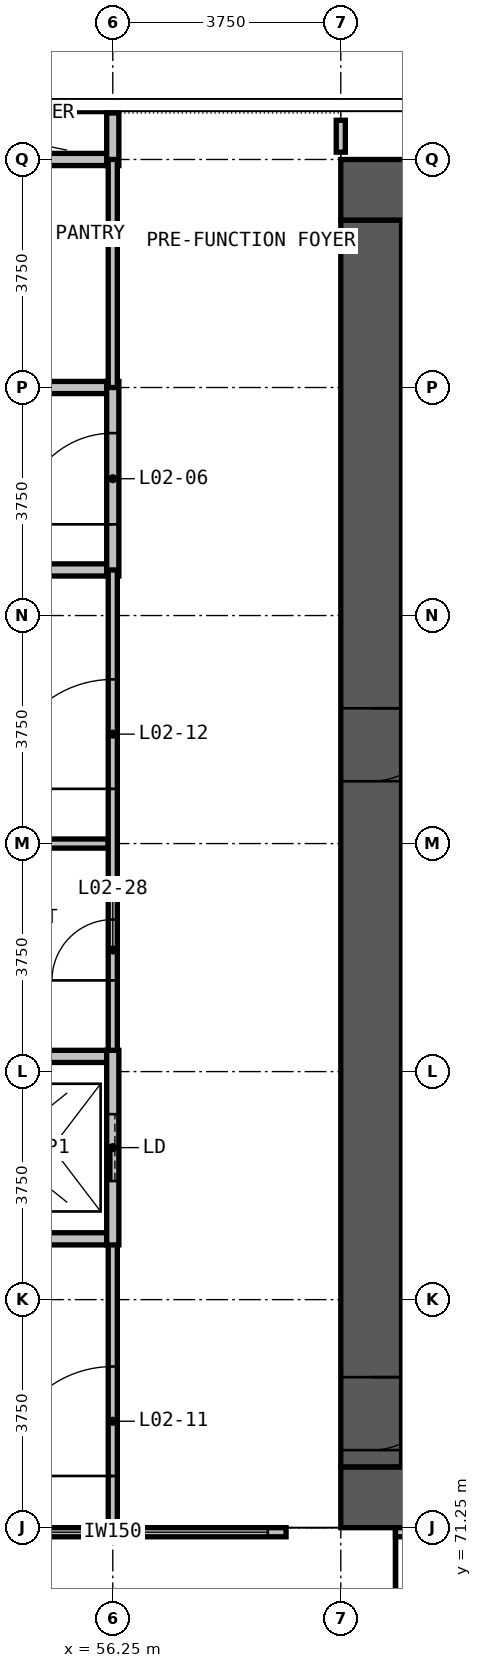
"""IFC4 building model, lengths in metres.
Left out: names, types, materials, properties, quantities, classifications, styles, units other than length and angle.
Written with IfcOpenShell. Run it as: python <this file> out.ifc"""

import sys

from ifc_helpers import new_model, si_unit, direction, frame, frame_2d, origin, place, context, subcontext, project, spatial, polyline, rectangle, outline, extrude, element, fill, save


model = new_model("IFC4")
c1 = context("Model", 3, precision=1e-05, world=origin(), true_north=direction((0.0, 1.0)))
c2 = subcontext(c1, "Body", "Model", "MODEL_VIEW")
j1 = project(units=[si_unit("LENGTHUNIT", "METRE"), si_unit("PLANEANGLEUNIT", "RADIAN")], contexts=[c1])
p1 = place(None, origin())
s1 = spatial("IfcSite", under=j1, at=p1, CompositionType="ELEMENT")
p2 = place(p1, origin())
s2 = spatial("IfcBuilding", under=s1, at=p2, CompositionType="ELEMENT")
p3 = place(p2, frame((0.0, 0.0, 16.5)))
s3 = spatial("IfcBuildingStorey", under=s2, at=p3, CompositionType="ELEMENT", Elevation=16.5)
p4 = place(p3, frame((60.9, 62.22, 0.0), z_axis=(1.0, 0.0, 0.0), x_axis=(0.0, 1.0, 0.0)))
e1 = element("IfcWall", 1, at=p4, inside=s3, PredefinedType="SHEAR", context=c2, shape_type="SweptSolid", body=[
    extrude(outline(polyline([(0.0, 0.0), (9.03, 0.0), (9.03, 7.5), (5.28, 7.5), (5.28, 7.15), (-17.22, 7.15), (-17.22, 7.5), (-20.97, 7.5), (-20.97, 0.0), (-11.941, 0.0), (-11.595, 0.488), (-10.658, 1.607), (-9.72, 2.522), (-8.783, 3.234), (-7.845, 3.743), (-6.908, 4.048), (-5.97, 4.15), (-5.033, 4.048), (-4.095, 3.743), (-3.158, 3.234), (-2.22, 2.522), (-1.283, 1.607), (-0.345, 0.488), (0.0, 0.0)])), origin(), (0.0, 0.0, -1.0), 1.8),
])
for number, where, z_axis, x_axis in (
    (2, (60.0, 71.75, 0.0), (0.0, 0.0, 1.0), (1.0, 0.0, 0.0)),
    (3, (90.0, 93.25, 0.0), (0.0, 0.0, 1.0), (-1.0, 0.0, 0.0)),
):
    element("IfcWall", number, at=place(p3, frame(where, z_axis=z_axis, x_axis=x_axis)), inside=s3, PredefinedType="SHEAR", context=c2, shape_type="SweptSolid", body=[
        extrude(rectangle(XDim=30.0, YDim=1.0, at=frame_2d((15.0, 0.0))), origin(), (0.0, 0.0, 1.0), 7.5),
    ])
p5 = place(p3, frame((60.5, 92.75, 0.0), z_axis=(0.0, 0.0, 1.0), x_axis=(0.0, -1.0, 0.0)))
e4 = element("IfcWall", 4, at=p5, inside=s3, PredefinedType="SHEAR", context=c2, shape_type="SweptSolid", body=[
    extrude(rectangle(XDim=20.5, YDim=1.0, at=frame_2d((10.25, 0.0))), origin(), (0.0, 0.0, 1.0), 7.5),
])
p6 = place(p5, frame((19.025, 0.0, 0.0)))
e5 = element("IfcOpeningElement", 5, at=p6, cuts=e4, PredefinedType="OPENING", context=c2, shape_type="SweptSolid", body=[
    extrude(rectangle(XDim=1.2, YDim=2.2, at=frame_2d((0.6, 1.1))), frame((0.0, 0.51, 0.0), z_axis=(0.0, -1.0, 0.0), x_axis=(1.0, 0.0, 0.0)), (0.0, 0.0, 1.0), 1.02),
])
p7 = place(p5, frame((8.025, 0.0, 0.0)))
e6 = element("IfcOpeningElement", 6, at=p7, cuts=e4, PredefinedType="OPENING", context=c2, shape_type="SweptSolid", body=[
    extrude(rectangle(XDim=1.2, YDim=2.2, at=frame_2d((0.6, 1.1))), frame((0.0, 0.51, 0.0), z_axis=(0.0, -1.0, 0.0), x_axis=(1.0, 0.0, 0.0)), (0.0, 0.0, 1.0), 1.02),
])
p8 = place(p3, frame((53.4, 71.175, 0.0), z_axis=(0.0, 0.0, 1.0), x_axis=(1.0, 0.0, 0.0)))
e7 = element("IfcWall", 7, at=p8, inside=s3, PredefinedType="SOLIDWALL", context=c2, shape_type="SweptSolid", body=[
    extrude(rectangle(XDim=5.7, YDim=0.15, at=frame_2d((2.85, 0.0))), origin(), (0.0, 0.0, 1.0), 7.15),
])
p9 = place(p8, frame((0.3, 0.0, 0.9)))
e8 = element("IfcOpeningElement", 8, at=p9, cuts=e7, PredefinedType="OPENING", context=c2, shape_type="SweptSolid", body=[
    extrude(rectangle(XDim=2.4, YDim=3.6, at=frame_2d((1.2, 1.8))), frame((0.0, 0.085, 0.0), z_axis=(0.0, -1.0, 0.0), x_axis=(1.0, 0.0, 0.0)), (0.0, 0.0, 1.0), 0.17),
])
p10 = place(p8, frame((3.0, 0.0, 0.9)))
e9 = element("IfcOpeningElement", 9, at=p10, cuts=e7, PredefinedType="OPENING", context=c2, shape_type="SweptSolid", body=[
    extrude(rectangle(XDim=2.4, YDim=3.6, at=frame_2d((1.2, 1.8))), frame((0.0, 0.085, 0.0), z_axis=(0.0, -1.0, 0.0), x_axis=(1.0, 0.0, 0.0)), (0.0, 0.0, 1.0), 0.17),
])
p11 = place(p3, frame((60.9, 71.175, 0.0), z_axis=(0.0, 0.0, 1.0), x_axis=(1.0, 0.0, 0.0)))
e10 = element("IfcWall", 10, at=p11, inside=s3, PredefinedType="SOLIDWALL", context=c2, shape_type="SweptSolid", body=[
    extrude(rectangle(XDim=5.7, YDim=0.15, at=frame_2d((2.85, 0.0))), origin(), (0.0, 0.0, 1.0), 7.15),
])
p12 = place(p3, frame((52.6, 93.75, 0.0), z_axis=(0.0, 0.0, 1.0), x_axis=(1.0, 0.0, 0.0)))
e11 = element("IfcWall", 11, at=p12, inside=s3, PredefinedType="PARTITIONING", context=c2, shape_type="SweptSolid", body=[
    extrude(rectangle(XDim=3.55, YDim=0.2, at=frame_2d((1.775, 0.0))), origin(), (0.0, 0.0, 1.0), 7.15),
])
p13 = place(p3, frame((56.25, 93.65, 0.0), z_axis=(0.0, 0.0, 1.0), x_axis=(0.0, 1.0, 0.0)))
e12 = element("IfcWall", 12, at=p13, inside=s3, PredefinedType="PARTITIONING", context=c2, shape_type="SweptSolid", body=[
    extrude(rectangle(XDim=0.865, YDim=0.2, at=frame_2d((0.433, 0.0))), origin(), (0.0, 0.0, 1.0), 7.15),
])
p14 = place(p3, frame((43.625, 87.0, 0.0), z_axis=(0.0, 0.0, 1.0), x_axis=(1.0, 0.0, 0.0)))
e13 = element("IfcWall", 13, at=p14, inside=s3, PredefinedType="PARTITIONING", context=c2, shape_type="SweptSolid", body=[
    extrude(rectangle(XDim=12.525, YDim=0.2, at=frame_2d((6.262, 0.0))), origin(), (0.0, 0.0, 1.0), 7.15),
])
p15 = place(p14, frame((5.95, 0.0, 0.0)))
e14 = element("IfcOpeningElement", 14, at=p15, cuts=e13, PredefinedType="OPENING", context=c2, shape_type="SweptSolid", body=[
    extrude(rectangle(XDim=1.8, YDim=2.2, at=frame_2d((0.9, 1.1))), frame((0.0, 0.11, 0.0), z_axis=(0.0, -1.0, 0.0), x_axis=(1.0, 0.0, 0.0)), (0.0, 0.0, 1.0), 0.22),
])
p16 = place(p3, frame((45.1, 90.0, 0.0), z_axis=(0.0, 0.0, 1.0), x_axis=(1.0, 0.0, 0.0)))
e15 = element("IfcWall", 15, at=p16, inside=s3, PredefinedType="PARTITIONING", context=c2, shape_type="SweptSolid", body=[
    extrude(rectangle(XDim=11.05, YDim=0.2, at=frame_2d((5.525, 0.0))), origin(), (0.0, 0.0, 1.0), 7.15),
])
p17 = place(p16, frame((4.45, 0.0, 0.0)))
e16 = element("IfcOpeningElement", 16, at=p17, cuts=e15, PredefinedType="OPENING", context=c2, shape_type="SweptSolid", body=[
    extrude(rectangle(XDim=0.9, YDim=2.2, at=frame_2d((0.45, 1.1))), frame((0.0, 0.11, 0.0), z_axis=(0.0, -1.0, 0.0), x_axis=(1.0, 0.0, 0.0)), (0.0, 0.0, 1.0), 0.22),
])
p18 = place(p16, frame((8.8, 0.0, 0.0)))
e17 = element("IfcOpeningElement", 17, at=p18, cuts=e15, PredefinedType="OPENING", context=c2, shape_type="SweptSolid", body=[
    extrude(rectangle(XDim=0.9, YDim=2.2, at=frame_2d((0.45, 1.1))), frame((0.0, 0.11, 0.0), z_axis=(0.0, -1.0, 0.0), x_axis=(1.0, 0.0, 0.0)), (0.0, 0.0, 1.0), 0.22),
])
p19 = place(p3, frame((56.25, 86.9, 0.0), z_axis=(0.0, 0.0, 1.0), x_axis=(0.0, 1.0, 0.0)))
e18 = element("IfcWall", 18, at=p19, inside=s3, PredefinedType="PARTITIONING", context=c2, shape_type="SweptSolid", body=[
    extrude(rectangle(XDim=3.2, YDim=0.2, at=frame_2d((1.6, 0.0))), origin(), (0.0, 0.0, 1.0), 7.15),
])
p20 = place(p19, frame((0.85, 0.0, 0.0)))
e19 = element("IfcOpeningElement", 19, at=p20, cuts=e18, PredefinedType="OPENING", context=c2, shape_type="SweptSolid", body=[
    extrude(rectangle(XDim=1.5, YDim=2.2, at=frame_2d((0.75, 1.1))), frame((0.0, 0.11, 0.0), z_axis=(0.0, -1.0, 0.0), x_axis=(1.0, 0.0, 0.0)), (0.0, 0.0, 1.0), 0.22),
])
p21 = place(p3, frame((52.575, 82.5, 0.0), z_axis=(0.0, 0.0, 1.0), x_axis=(1.0, 0.0, 0.0)))
e20 = element("IfcWall", 20, at=p21, inside=s3, PredefinedType="PARTITIONING", context=c2, shape_type="SweptSolid", body=[
    extrude(rectangle(XDim=3.6, YDim=0.15, at=frame_2d((1.8, 0.0))), origin(), (0.0, 0.0, 1.0), 7.15),
])
p22 = place(p3, frame((56.25, 71.25, 0.0), z_axis=(0.0, 0.0, 1.0), x_axis=(0.0, 1.0, 0.0)))
e21 = element("IfcWall", 21, at=p22, inside=s3, PredefinedType="PARTITIONING", context=c2, shape_type="SweptSolid", body=[
    extrude(rectangle(XDim=4.85, YDim=0.15, at=frame_2d((2.425, 0.0))), origin(), (0.0, 0.0, 1.0), 7.15),
])
p23 = place(p22, frame((0.85, 0.0, 0.0)))
e22 = element("IfcOpeningElement", 22, at=p23, cuts=e21, PredefinedType="OPENING", context=c2, shape_type="SweptSolid", body=[
    extrude(rectangle(XDim=1.8, YDim=2.2, at=frame_2d((0.9, 1.1))), frame((0.0, 0.085, 0.0), z_axis=(0.0, -1.0, 0.0), x_axis=(1.0, 0.0, 0.0)), (0.0, 0.0, 1.0), 0.17),
])
p24 = place(p3, frame((56.25, 78.9, 0.0), z_axis=(0.0, 0.0, 1.0), x_axis=(0.0, 1.0, 0.0)))
e23 = element("IfcWall", 23, at=p24, inside=s3, PredefinedType="PARTITIONING", context=c2, shape_type="SweptSolid", body=[
    extrude(rectangle(XDim=8.1, YDim=0.15, at=frame_2d((4.05, 0.0))), origin(), (0.0, 0.0, 1.0), 7.15),
])
p25 = place(p24, frame((4.5, 0.0, 0.0)))
e24 = element("IfcOpeningElement", 24, at=p25, cuts=e23, PredefinedType="OPENING", context=c2, shape_type="SweptSolid", body=[
    extrude(rectangle(XDim=1.8, YDim=2.2, at=frame_2d((0.9, 1.1))), frame((0.0, 0.085, 0.0), z_axis=(0.0, -1.0, 0.0), x_axis=(1.0, 0.0, 0.0)), (0.0, 0.0, 1.0), 0.17),
])
p26 = place(p24, frame((1.35, 0.0, 0.0)))
e25 = element("IfcOpeningElement", 25, at=p26, cuts=e23, PredefinedType="OPENING", context=c2, shape_type="SweptSolid", body=[
    extrude(rectangle(XDim=1.0, YDim=2.2, at=frame_2d((0.5, 1.1))), frame((0.0, 0.085, 0.0), z_axis=(0.0, -1.0, 0.0), x_axis=(1.0, 0.0, 0.0)), (0.0, 0.0, 1.0), 0.17),
])
p27 = place(p3, frame((56.25, 90.0, 0.0), z_axis=(0.0, 0.0, 1.0), x_axis=(0.0, 1.0, 0.0)))
e26 = element("IfcWall", 26, at=p27, inside=s3, PredefinedType="PARTITIONING", context=c2, shape_type="SweptSolid", body=[
    extrude(rectangle(XDim=3.75, YDim=0.15, at=frame_2d((1.875, 0.0))), origin(), (0.0, 0.0, 1.0), 7.15),
])
p28 = place(p3, frame((60.0, 93.87, 0.0), z_axis=(0.0, 0.0, 1.0), x_axis=(0.0, 1.0, 0.0)))
e27 = element("IfcWall", 27, at=p28, inside=s3, PredefinedType="PARTITIONING", context=c2, shape_type="SweptSolid", body=[
    extrude(rectangle(XDim=0.525, YDim=0.15, at=frame_2d((0.262, 0.0))), origin(), (0.0, 0.0, 1.0), 7.15),
])
for number, where, z_axis, x_axis in (
    (28, (52.6, 76.0, 0.0), (0.0, 0.0, 1.0), (1.0, 0.0, 0.0)),
    (29, (52.6, 79.0, 0.0), (0.0, 0.0, 1.0), (1.0, 0.0, 0.0)),
):
    element("IfcWall", number, at=place(p3, frame(where, z_axis=z_axis, x_axis=x_axis)), inside=s3, PredefinedType="PARTITIONING", context=c2, shape_type="SweptSolid", body=[
        extrude(rectangle(XDim=3.55, YDim=0.2, at=frame_2d((1.775, 0.0))), origin(), (0.0, 0.0, 1.0), 7.15),
    ])
p29 = place(p3, frame((56.25, 75.9, 0.0), z_axis=(0.0, 0.0, 1.0), x_axis=(0.0, 1.0, 0.0)))
e30 = element("IfcWall", 30, at=p29, inside=s3, PredefinedType="PARTITIONING", context=c2, shape_type="SweptSolid", body=[
    extrude(rectangle(XDim=3.2, YDim=0.2, at=frame_2d((1.6, 0.0))), origin(), (0.0, 0.0, 1.0), 7.15),
])
p30 = place(p29, frame((1.05, 0.0, 0.0)))
e31 = element("IfcOpeningElement", 31, at=p30, cuts=e30, PredefinedType="OPENING", context=c2, shape_type="SweptSolid", body=[
    extrude(rectangle(XDim=1.1, YDim=2.2, at=frame_2d((0.55, 1.1))), frame((0.0, 0.11, 0.0), z_axis=(0.0, -1.0, 0.0), x_axis=(1.0, 0.0, 0.0)), (0.0, 0.0, 1.0), 0.22),
])
p31 = place(p9, origin())
e32 = element("IfcWindow", 32, at=p31, inside=s3, PartitioningType="SINGLE_PANEL", PredefinedType="WINDOW", context=c2, shape_type="SweptSolid", body=[
    extrude(rectangle(XDim=2.4, YDim=3.6, at=frame_2d((1.2, 1.8))), frame((0.0, 0.03, 0.0), z_axis=(0.0, -1.0, 0.0), x_axis=(1.0, 0.0, 0.0)), (0.0, 0.0, 1.0), 0.06),
])
fill(e8, e32)
p32 = place(p10, origin())
e33 = element("IfcWindow", 33, at=p32, inside=s3, PartitioningType="SINGLE_PANEL", PredefinedType="WINDOW", context=c2, shape_type="SweptSolid", body=[
    extrude(rectangle(XDim=2.4, YDim=3.6, at=frame_2d((1.2, 1.8))), frame((0.0, 0.03, 0.0), z_axis=(0.0, -1.0, 0.0), x_axis=(1.0, 0.0, 0.0)), (0.0, 0.0, 1.0), 0.06),
])
fill(e9, e33)
p33 = place(p6, origin())
e34 = element("IfcDoor", 34, at=p33, inside=s3, OperationType="SINGLE_SWING_LEFT", PredefinedType="DOOR", context=c2, shape_type="SweptSolid", body=[
    extrude(rectangle(XDim=1.2, YDim=2.2, at=frame_2d((0.6, 1.1))), frame((0.0, 0.025, 0.0), z_axis=(0.0, -1.0, 0.0), x_axis=(1.0, 0.0, 0.0)), (0.0, 0.0, 1.0), 0.05),
])
fill(e5, e34)
p34 = place(p20, origin())
e35 = element("IfcDoor", 35, at=p34, inside=s3, OperationType="DOUBLE_DOOR_SINGLE_SWING", PredefinedType="DOOR", context=c2, shape_type="SweptSolid", body=[
    extrude(rectangle(XDim=1.5, YDim=2.2, at=frame_2d((0.75, 1.1))), frame((0.0, 0.025, 0.0), z_axis=(0.0, -1.0, 0.0), x_axis=(1.0, 0.0, 0.0)), (0.0, 0.0, 1.0), 0.05),
])
fill(e19, e35)
p35 = place(p30, origin())
e36 = element("IfcDoor", 36, at=p35, inside=s3, OperationType="DOUBLE_DOOR_SLIDING", PredefinedType="DOOR", context=c2, shape_type="SweptSolid", body=[
    extrude(rectangle(XDim=1.1, YDim=2.2, at=frame_2d((0.55, 1.1))), frame((0.0, 0.025, 0.0), z_axis=(0.0, -1.0, 0.0), x_axis=(1.0, 0.0, 0.0)), (0.0, 0.0, 1.0), 0.05),
])
fill(e31, e36)
p36 = place(p23, origin())
e37 = element("IfcDoor", 37, at=p36, inside=s3, OperationType="DOUBLE_DOOR_SINGLE_SWING", PredefinedType="DOOR", context=c2, shape_type="SweptSolid", body=[
    extrude(rectangle(XDim=1.8, YDim=2.2, at=frame_2d((0.9, 1.1))), frame((0.0, 0.025, 0.0), z_axis=(0.0, -1.0, 0.0), x_axis=(1.0, 0.0, 0.0)), (0.0, 0.0, 1.0), 0.05),
])
fill(e22, e37)
p37 = place(p25, origin())
e38 = element("IfcDoor", 38, at=p37, inside=s3, OperationType="DOUBLE_DOOR_SINGLE_SWING", PredefinedType="DOOR", context=c2, shape_type="SweptSolid", body=[
    extrude(rectangle(XDim=1.8, YDim=2.2, at=frame_2d((0.9, 1.1))), frame((0.0, 0.025, 0.0), z_axis=(0.0, -1.0, 0.0), x_axis=(1.0, 0.0, 0.0)), (0.0, 0.0, 1.0), 0.05),
])
fill(e24, e38)
p38 = place(p7, origin())
e39 = element("IfcDoor", 39, at=p38, inside=s3, OperationType="SINGLE_SWING_RIGHT", PredefinedType="DOOR", context=c2, shape_type="SweptSolid", body=[
    extrude(rectangle(XDim=1.2, YDim=2.2, at=frame_2d((0.6, 1.1))), frame((0.0, 0.025, 0.0), z_axis=(0.0, -1.0, 0.0), x_axis=(1.0, 0.0, 0.0)), (0.0, 0.0, 1.0), 0.05),
])
fill(e6, e39)
p39 = place(p26, origin())
e40 = element("IfcDoor", 40, at=p39, inside=s3, OperationType="SINGLE_SWING_RIGHT", PredefinedType="DOOR", context=c2, shape_type="SweptSolid", body=[
    extrude(rectangle(XDim=1.0, YDim=2.2, at=frame_2d((0.5, 1.1))), frame((0.0, 0.025, 0.0), z_axis=(0.0, -1.0, 0.0), x_axis=(1.0, 0.0, 0.0)), (0.0, 0.0, 1.0), 0.05),
])
fill(e25, e40)
save(model, sys.argv[1])
